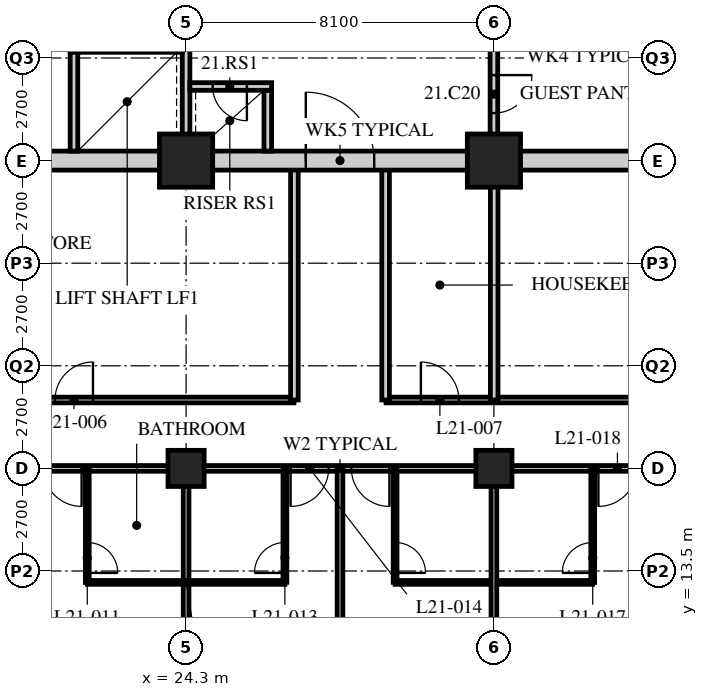
"""IFC4 building model, lengths in metres.
Left out: names, types, materials, properties, quantities, classifications, styles, units other than length and angle.
Written with IfcOpenShell. Run it as: python <this file> out.ifc"""

import sys

from ifc_helpers import new_model, si_unit, direction, frame, frame_2d, origin, origin_2d, place, context, subcontext, project, spatial, rectangle, hollow_rectangle, extrude, element, fill, save


model = new_model("IFC4")
c1 = context("Model", 3, precision=1e-05, world=origin(), true_north=direction((0.0, 1.0)))
c2 = subcontext(c1, "Body", "Model", "MODEL_VIEW")
j1 = project(units=[si_unit("LENGTHUNIT", "METRE"), si_unit("PLANEANGLEUNIT", "RADIAN")], contexts=[c1])
p1 = place(None, origin())
s1 = spatial("IfcSite", under=j1, at=p1, CompositionType="ELEMENT")
p2 = place(p1, origin())
s2 = spatial("IfcBuilding", under=s1, at=p2, CompositionType="ELEMENT")
p3 = place(p2, frame((0.0, 0.0, 84.0)))
s3 = spatial("IfcBuildingStorey", under=s2, at=p3, CompositionType="ELEMENT", Elevation=84.0)
p4 = place(p3, frame((24.3, 16.2, 0.0), z_axis=(0.0, 0.0, 1.0), x_axis=(1.0, 0.0, 0.0)))
e1 = element("IfcColumn", 1, at=p4, inside=s3, PredefinedType="COLUMN", context=c2, shape_type="SweptSolid", body=[
    extrude(hollow_rectangle(XDim=0.95, YDim=0.95, WallThickness=0.095, at=origin_2d()), origin(), (0.0, 0.0, 1.0), 3.4),
])
p5 = place(p3, frame((24.3, 24.3, 0.0), z_axis=(0.0, 0.0, 1.0), x_axis=(1.0, 0.0, 0.0)))
e2 = element("IfcColumn", 2, at=p5, inside=s3, PredefinedType="COLUMN", context=c2, shape_type="SweptSolid", body=[
    extrude(hollow_rectangle(XDim=1.4, YDim=1.4, WallThickness=0.12, at=origin_2d()), origin(), (0.0, 0.0, 1.0), 3.4),
])
p6 = place(p3, frame((32.4, 16.2, 0.0), z_axis=(0.0, 0.0, 1.0), x_axis=(1.0, 0.0, 0.0)))
e3 = element("IfcColumn", 3, at=p6, inside=s3, PredefinedType="COLUMN", context=c2, shape_type="SweptSolid", body=[
    extrude(hollow_rectangle(XDim=0.95, YDim=0.95, WallThickness=0.095, at=origin_2d()), origin(), (0.0, 0.0, 1.0), 3.4),
])
p7 = place(p3, frame((32.4, 24.3, 0.0), z_axis=(0.0, 0.0, 1.0), x_axis=(1.0, 0.0, 0.0)))
e4 = element("IfcColumn", 4, at=p7, inside=s3, PredefinedType="COLUMN", context=c2, shape_type="SweptSolid", body=[
    extrude(hollow_rectangle(XDim=1.4, YDim=1.4, WallThickness=0.12, at=origin_2d()), origin(), (0.0, 0.0, 1.0), 3.4),
])
p8 = place(p3, frame((12.15, 16.2, 0.0), z_axis=(0.0, 0.0, 1.0), x_axis=(1.0, 0.0, 0.0)))
e5 = element("IfcWall", 5, at=p8, inside=s3, PredefinedType="PARTITIONING", context=c2, shape_type="SweptSolid", body=[
    extrude(rectangle(XDim=32.4, YDim=0.15, at=frame_2d((16.2, 0.0))), origin(), (0.0, 0.0, 1.0), 2.428),
])
p9 = place(p8, frame((6.5, 0.0, 0.0)))
e6 = element("IfcOpeningElement", 6, at=p9, cuts=e5, PredefinedType="OPENING", context=c2, shape_type="SweptSolid", body=[
    extrude(rectangle(XDim=1.0, YDim=2.1, at=frame_2d((0.5, 1.05))), frame((0.0, 0.085, 0.0), z_axis=(0.0, -1.0, 0.0), x_axis=(1.0, 0.0, 0.0)), (0.0, 0.0, 1.0), 0.17),
])
p10 = place(p8, frame((8.4, 0.0, 0.0)))
e7 = element("IfcOpeningElement", 7, at=p10, cuts=e5, PredefinedType="OPENING", context=c2, shape_type="SweptSolid", body=[
    extrude(rectangle(XDim=1.0, YDim=2.1, at=frame_2d((0.5, 1.05))), frame((0.0, 0.085, 0.0), z_axis=(0.0, -1.0, 0.0), x_axis=(1.0, 0.0, 0.0)), (0.0, 0.0, 1.0), 0.17),
])
p11 = place(p8, frame((14.9, 0.0, 0.0)))
e8 = element("IfcOpeningElement", 8, at=p11, cuts=e5, PredefinedType="OPENING", context=c2, shape_type="SweptSolid", body=[
    extrude(rectangle(XDim=1.0, YDim=2.1, at=frame_2d((0.5, 1.05))), frame((0.0, 0.085, 0.0), z_axis=(0.0, -1.0, 0.0), x_axis=(1.0, 0.0, 0.0)), (0.0, 0.0, 1.0), 0.17),
])
p12 = place(p8, frame((16.5, 0.0, 0.0)))
e9 = element("IfcOpeningElement", 9, at=p12, cuts=e5, PredefinedType="OPENING", context=c2, shape_type="SweptSolid", body=[
    extrude(rectangle(XDim=1.0, YDim=2.1, at=frame_2d((0.5, 1.05))), frame((0.0, 0.085, 0.0), z_axis=(0.0, -1.0, 0.0), x_axis=(1.0, 0.0, 0.0)), (0.0, 0.0, 1.0), 0.17),
])
p13 = place(p8, frame((23.0, 0.0, 0.0)))
e10 = element("IfcOpeningElement", 10, at=p13, cuts=e5, PredefinedType="OPENING", context=c2, shape_type="SweptSolid", body=[
    extrude(rectangle(XDim=1.0, YDim=2.1, at=frame_2d((0.5, 1.05))), frame((0.0, 0.085, 0.0), z_axis=(0.0, -1.0, 0.0), x_axis=(1.0, 0.0, 0.0)), (0.0, 0.0, 1.0), 0.17),
])
p14 = place(p8, frame((24.9, 0.0, 0.0)))
e11 = element("IfcOpeningElement", 11, at=p14, cuts=e5, PredefinedType="OPENING", context=c2, shape_type="SweptSolid", body=[
    extrude(rectangle(XDim=1.0, YDim=2.1, at=frame_2d((0.5, 1.05))), frame((0.0, 0.085, 0.0), z_axis=(0.0, -1.0, 0.0), x_axis=(1.0, 0.0, 0.0)), (0.0, 0.0, 1.0), 0.17),
])
p15 = place(p8, frame((1.525, 0.0, 0.0)))
e12 = element("IfcOpeningElement", 12, at=p15, cuts=e5, PredefinedType="OPENING", context=c2, shape_type="SweptSolid", body=[
    extrude(rectangle(XDim=1.0, YDim=2.1, at=frame_2d((0.5, 1.05))), frame((0.0, 0.085, 0.0), z_axis=(0.0, -1.0, 0.0), x_axis=(1.0, 0.0, 0.0)), (0.0, 0.0, 1.0), 0.17),
])
p16 = place(p8, frame((29.875, 0.0, 0.0)))
e13 = element("IfcOpeningElement", 13, at=p16, cuts=e5, PredefinedType="OPENING", context=c2, shape_type="SweptSolid", body=[
    extrude(rectangle(XDim=1.0, YDim=2.1, at=frame_2d((0.5, 1.05))), frame((0.0, 0.085, 0.0), z_axis=(0.0, -1.0, 0.0), x_axis=(1.0, 0.0, 0.0)), (0.0, 0.0, 1.0), 0.17),
])
p17 = place(p3, frame((13.95, 18.0, 0.0), z_axis=(0.0, 0.0, 1.0), x_axis=(1.0, 0.0, 0.0)))
e14 = element("IfcWall", 14, at=p17, inside=s3, PredefinedType="PARTITIONING", context=c2, shape_type="SweptSolid", body=[
    extrude(rectangle(XDim=13.19, YDim=0.15, at=frame_2d((6.595, 0.0))), origin(), (0.0, 0.0, 1.0), 3.19),
])
p18 = place(p17, frame((0.3, 0.0, 0.0)))
e15 = element("IfcOpeningElement", 15, at=p18, cuts=e14, PredefinedType="OPENING", context=c2, shape_type="SweptSolid", body=[
    extrude(rectangle(XDim=1.0, YDim=2.1, at=frame_2d((0.5, 1.05))), frame((0.0, 0.085, 0.0), z_axis=(0.0, -1.0, 0.0), x_axis=(1.0, 0.0, 0.0)), (0.0, 0.0, 1.0), 0.17),
])
p19 = place(p17, frame((6.9, 0.0, 0.0)))
e16 = element("IfcOpeningElement", 16, at=p19, cuts=e14, PredefinedType="OPENING", context=c2, shape_type="SweptSolid", body=[
    extrude(rectangle(XDim=1.0, YDim=2.1, at=frame_2d((0.5, 1.05))), frame((0.0, 0.085, 0.0), z_axis=(0.0, -1.0, 0.0), x_axis=(1.0, 0.0, 0.0)), (0.0, 0.0, 1.0), 0.17),
])
p20 = place(p3, frame((29.56, 18.0, 0.0), z_axis=(0.0, 0.0, 1.0), x_axis=(1.0, 0.0, 0.0)))
e17 = element("IfcWall", 17, at=p20, inside=s3, PredefinedType="PARTITIONING", context=c2, shape_type="SweptSolid", body=[
    extrude(rectangle(XDim=13.19, YDim=0.15, at=frame_2d((6.595, 0.0))), origin(), (0.0, 0.0, 1.0), 3.19),
])
p21 = place(p20, frame((0.919, 0.0, 0.0)))
e18 = element("IfcOpeningElement", 18, at=p21, cuts=e17, PredefinedType="OPENING", context=c2, shape_type="SweptSolid", body=[
    extrude(rectangle(XDim=1.0, YDim=2.1, at=frame_2d((0.5, 1.05))), frame((0.0, 0.085, 0.0), z_axis=(0.0, -1.0, 0.0), x_axis=(1.0, 0.0, 0.0)), (0.0, 0.0, 1.0), 0.17),
])
p22 = place(p20, frame((7.519, 0.0, 0.0)))
e19 = element("IfcOpeningElement", 19, at=p22, cuts=e17, PredefinedType="OPENING", context=c2, shape_type="SweptSolid", body=[
    extrude(rectangle(XDim=1.0, YDim=2.1, at=frame_2d((0.5, 1.05))), frame((0.0, 0.085, 0.0), z_axis=(0.0, -1.0, 0.0), x_axis=(1.0, 0.0, 0.0)), (0.0, 0.0, 1.0), 0.17),
])
p23 = place(p3, frame((32.407, 18.0, 0.0), z_axis=(0.0, 0.0, 1.0), x_axis=(0.0, 1.0, 0.0)))
e20 = element("IfcWall", 20, at=p23, inside=s3, PredefinedType="SOLIDWALL", context=c2, shape_type="SweptSolid", body=[
    extrude(rectangle(XDim=6.3, YDim=0.2, at=frame_2d((3.15, 0.0))), origin(), (0.0, 0.0, 1.0), 2.428),
])
for number, where, z_axis, x_axis in (
    (21, (27.15, 18.0, 0.0), (0.0, 0.0, 1.0), (0.0, 1.0, 0.0)),
    (22, (29.55, 18.0, 0.0), (0.0, 0.0, 1.0), (0.0, 1.0, 0.0)),
):
    element("IfcWall", number, at=place(p3, frame(where, z_axis=z_axis, x_axis=x_axis)), inside=s3, PredefinedType="SOLIDWALL", context=c2, shape_type="SweptSolid", body=[
        extrude(rectangle(XDim=6.3, YDim=0.2, at=frame_2d((3.15, 0.0))), origin(), (0.0, 0.0, 1.0), 3.19),
    ])
p24 = place(p3, frame((21.7, 13.2, 0.0), z_axis=(0.0, 0.0, 1.0), x_axis=(1.0, 0.0, 0.0)))
e23 = element("IfcWall", 23, at=p24, inside=s3, PredefinedType="PARTITIONING", context=c2, shape_type="SweptSolid", body=[
    extrude(rectangle(XDim=5.2, YDim=0.1, at=frame_2d((2.6, 0.0))), origin(), (0.0, 0.0, 1.0), 3.19),
])
p25 = place(p3, frame((21.7, 16.2, 0.0), z_axis=(0.0, 0.0, 1.0), x_axis=(0.0, -1.0, 0.0)))
e24 = element("IfcWall", 24, at=p25, inside=s3, PredefinedType="PARTITIONING", context=c2, shape_type="SweptSolid", body=[
    extrude(rectangle(XDim=3.0, YDim=0.1, at=frame_2d((1.5, 0.0))), origin(), (0.0, 0.0, 1.0), 3.19),
])
p26 = place(p25, frame((1.95, 0.0, 0.0)))
e25 = element("IfcOpeningElement", 25, at=p26, cuts=e24, PredefinedType="OPENING", context=c2, shape_type="SweptSolid", body=[
    extrude(rectangle(XDim=0.8, YDim=2.1, at=frame_2d((0.4, 1.05))), frame((0.0, 0.06, 0.0), z_axis=(0.0, -1.0, 0.0), x_axis=(1.0, 0.0, 0.0)), (0.0, 0.0, 1.0), 0.12),
])
p27 = place(p3, frame((24.3, 16.2, 0.0), z_axis=(0.0, 0.0, 1.0), x_axis=(0.0, -1.0, 0.0)))
e26 = element("IfcWall", 26, at=p27, inside=s3, PredefinedType="PARTITIONING", context=c2, shape_type="SweptSolid", body=[
    extrude(rectangle(XDim=15.9, YDim=0.15, at=frame_2d((7.95, 0.0))), origin(), (0.0, 0.0, 1.0), 2.428),
])
p28 = place(p3, frame((26.9, 16.2, 0.0), z_axis=(0.0, 0.0, 1.0), x_axis=(0.0, -1.0, 0.0)))
e27 = element("IfcWall", 27, at=p28, inside=s3, PredefinedType="PARTITIONING", context=c2, shape_type="SweptSolid", body=[
    extrude(rectangle(XDim=3.0, YDim=0.1, at=frame_2d((1.5, 0.0))), origin(), (0.0, 0.0, 1.0), 3.19),
])
p29 = place(p28, frame((1.95, 0.0, 0.0)))
e28 = element("IfcOpeningElement", 28, at=p29, cuts=e27, PredefinedType="OPENING", context=c2, shape_type="SweptSolid", body=[
    extrude(rectangle(XDim=0.8, YDim=2.1, at=frame_2d((0.4, 1.05))), frame((0.0, 0.06, 0.0), z_axis=(0.0, -1.0, 0.0), x_axis=(1.0, 0.0, 0.0)), (0.0, 0.0, 1.0), 0.12),
])
p30 = place(p3, frame((28.35, 16.2, 0.0), z_axis=(0.0, 0.0, 1.0), x_axis=(0.0, -1.0, 0.0)))
e29 = element("IfcWall", 29, at=p30, inside=s3, PredefinedType="PARTITIONING", context=c2, shape_type="SweptSolid", body=[
    extrude(rectangle(XDim=15.9, YDim=0.15, at=frame_2d((7.95, 0.0))), origin(), (0.0, 0.0, 1.0), 3.19),
])
p31 = place(p3, frame((29.8, 13.2, 0.0), z_axis=(0.0, 0.0, 1.0), x_axis=(1.0, 0.0, 0.0)))
e30 = element("IfcWall", 30, at=p31, inside=s3, PredefinedType="PARTITIONING", context=c2, shape_type="SweptSolid", body=[
    extrude(rectangle(XDim=5.2, YDim=0.1, at=frame_2d((2.6, 0.0))), origin(), (0.0, 0.0, 1.0), 3.19),
])
p32 = place(p3, frame((29.8, 16.2, 0.0), z_axis=(0.0, 0.0, 1.0), x_axis=(0.0, -1.0, 0.0)))
e31 = element("IfcWall", 31, at=p32, inside=s3, PredefinedType="PARTITIONING", context=c2, shape_type="SweptSolid", body=[
    extrude(rectangle(XDim=3.0, YDim=0.1, at=frame_2d((1.5, 0.0))), origin(), (0.0, 0.0, 1.0), 3.19),
])
p33 = place(p32, frame((1.95, 0.0, 0.0)))
e32 = element("IfcOpeningElement", 32, at=p33, cuts=e31, PredefinedType="OPENING", context=c2, shape_type="SweptSolid", body=[
    extrude(rectangle(XDim=0.8, YDim=2.1, at=frame_2d((0.4, 1.05))), frame((0.0, 0.06, 0.0), z_axis=(0.0, -1.0, 0.0), x_axis=(1.0, 0.0, 0.0)), (0.0, 0.0, 1.0), 0.12),
])
p34 = place(p3, frame((32.4, 16.2, 0.0), z_axis=(0.0, 0.0, 1.0), x_axis=(0.0, -1.0, 0.0)))
e33 = element("IfcWall", 33, at=p34, inside=s3, PredefinedType="PARTITIONING", context=c2, shape_type="SweptSolid", body=[
    extrude(rectangle(XDim=15.9, YDim=0.15, at=frame_2d((7.95, 0.0))), origin(), (0.0, 0.0, 1.0), 2.428),
])
p35 = place(p3, frame((35.0, 16.2, 0.0), z_axis=(0.0, 0.0, 1.0), x_axis=(0.0, -1.0, 0.0)))
e34 = element("IfcWall", 34, at=p35, inside=s3, PredefinedType="PARTITIONING", context=c2, shape_type="SweptSolid", body=[
    extrude(rectangle(XDim=3.0, YDim=0.1, at=frame_2d((1.5, 0.0))), origin(), (0.0, 0.0, 1.0), 3.19),
])
p36 = place(p35, frame((1.95, 0.0, 0.0)))
e35 = element("IfcOpeningElement", 35, at=p36, cuts=e34, PredefinedType="OPENING", context=c2, shape_type="SweptSolid", body=[
    extrude(rectangle(XDim=0.8, YDim=2.1, at=frame_2d((0.4, 1.05))), frame((0.0, 0.06, 0.0), z_axis=(0.0, -1.0, 0.0), x_axis=(1.0, 0.0, 0.0)), (0.0, 0.0, 1.0), 0.12),
])
p37 = place(p3, frame((15.95, 24.3, 0.0), z_axis=(0.0, 0.0, 1.0), x_axis=(1.0, 0.0, 0.0)))
e36 = element("IfcWall", 36, at=p37, inside=s3, PredefinedType="SOLIDWALL", context=c2, shape_type="SweptSolid", body=[
    extrude(rectangle(XDim=24.8, YDim=0.5, at=frame_2d((12.4, 0.0))), origin(), (0.0, 0.0, 1.0), 2.428),
])
p38 = place(p37, frame((11.5, 0.0, 0.0)))
e37 = element("IfcOpeningElement", 37, at=p38, cuts=e36, PredefinedType="OPENING", context=c2, shape_type="SweptSolid", body=[
    extrude(rectangle(XDim=1.8, YDim=2.4, at=frame_2d((0.9, 1.2))), frame((0.0, 0.26, 0.0), z_axis=(0.0, -1.0, 0.0), x_axis=(1.0, 0.0, 0.0)), (0.0, 0.0, 1.0), 0.52),
])
p39 = place(p3, frame((24.3, 24.55, 0.0), z_axis=(0.0, 0.0, 1.0), x_axis=(0.0, 1.0, 0.0)))
e38 = element("IfcWall", 38, at=p39, inside=s3, PredefinedType="SOLIDWALL", context=c2, shape_type="SweptSolid", body=[
    extrude(rectangle(XDim=7.75, YDim=0.2, at=frame_2d((3.875, 0.0))), origin(), (0.0, 0.0, 1.0), 2.578),
])
p40 = place(p39, frame((4.6, 0.0, 0.0)))
e39 = element("IfcOpeningElement", 39, at=p40, cuts=e38, PredefinedType="OPENING", context=c2, shape_type="SweptSolid", body=[
    extrude(rectangle(XDim=1.2, YDim=2.1, at=frame_2d((0.6, 1.05))), frame((0.0, 0.11, 0.0), z_axis=(0.0, -1.0, 0.0), x_axis=(1.0, 0.0, 0.0)), (0.0, 0.0, 1.0), 0.22),
])
p41 = place(p3, frame((21.35, 24.55, 0.0), z_axis=(0.0, 0.0, 1.0), x_axis=(0.0, 1.0, 0.0)))
e40 = element("IfcWall", 40, at=p41, inside=s3, PredefinedType="SOLIDWALL", context=c2, shape_type="SweptSolid", body=[
    extrude(rectangle(XDim=2.6, YDim=0.2, at=frame_2d((1.3, 0.0))), origin(), (0.0, 0.0, 1.0), 3.19),
])
p42 = place(p3, frame((26.45, 24.55, 0.0), z_axis=(0.0, 0.0, 1.0), x_axis=(0.0, 1.0, 0.0)))
e41 = element("IfcWall", 41, at=p42, inside=s3, PredefinedType="SOLIDWALL", context=c2, shape_type="SweptSolid", body=[
    extrude(rectangle(XDim=1.6, YDim=0.2, at=frame_2d((0.8, 0.0))), origin(), (0.0, 0.0, 1.0), 3.19),
])
p43 = place(p3, frame((24.4, 26.25, 0.0), z_axis=(0.0, 0.0, 1.0), x_axis=(1.0, 0.0, 0.0)))
e42 = element("IfcWall", 42, at=p43, inside=s3, PredefinedType="SOLIDWALL", context=c2, shape_type="SweptSolid", body=[
    extrude(rectangle(XDim=2.15, YDim=0.2, at=frame_2d((1.075, 0.0))), origin(), (0.0, 0.0, 1.0), 3.19),
])
p44 = place(p43, frame((0.6, 0.0, 0.0)))
e43 = element("IfcOpeningElement", 43, at=p44, cuts=e42, PredefinedType="OPENING", context=c2, shape_type="SweptSolid", body=[
    extrude(rectangle(XDim=0.9, YDim=2.1, at=frame_2d((0.45, 1.05))), frame((0.0, 0.11, 0.0), z_axis=(0.0, -1.0, 0.0), x_axis=(1.0, 0.0, 0.0)), (0.0, 0.0, 1.0), 0.22),
])
p45 = place(p3, frame((32.4, 24.55, 0.0), z_axis=(0.0, 0.0, 1.0), x_axis=(0.0, 1.0, 0.0)))
e44 = element("IfcWall", 44, at=p45, inside=s3, PredefinedType="PARTITIONING", context=c2, shape_type="SweptSolid", body=[
    extrude(rectangle(XDim=7.75, YDim=0.2, at=frame_2d((3.875, 0.0))), origin(), (0.0, 0.0, 1.0), 2.578),
])
p46 = place(p45, frame((1.0, 0.0, 0.0)))
e45 = element("IfcOpeningElement", 45, at=p46, cuts=e44, PredefinedType="OPENING", context=c2, shape_type="SweptSolid", body=[
    extrude(rectangle(XDim=1.0, YDim=2.1, at=frame_2d((0.5, 1.05))), frame((0.0, 0.11, 0.0), z_axis=(0.0, -1.0, 0.0), x_axis=(1.0, 0.0, 0.0)), (0.0, 0.0, 1.0), 0.22),
])
p47 = place(p45, frame((3.925, 0.0, 0.0)))
e46 = element("IfcOpeningElement", 46, at=p47, cuts=e44, PredefinedType="OPENING", context=c2, shape_type="SweptSolid", body=[
    extrude(rectangle(XDim=1.0, YDim=2.1, at=frame_2d((0.5, 1.05))), frame((0.0, 0.11, 0.0), z_axis=(0.0, -1.0, 0.0), x_axis=(1.0, 0.0, 0.0)), (0.0, 0.0, 1.0), 0.22),
])
p48 = place(p45, frame((6.1, 0.0, 0.0)))
e47 = element("IfcOpeningElement", 47, at=p48, cuts=e44, PredefinedType="OPENING", context=c2, shape_type="SweptSolid", body=[
    extrude(rectangle(XDim=0.9, YDim=2.1, at=frame_2d((0.45, 1.05))), frame((0.0, 0.11, 0.0), z_axis=(0.0, -1.0, 0.0), x_axis=(1.0, 0.0, 0.0)), (0.0, 0.0, 1.0), 0.22),
])
p49 = place(p19, origin())
e48 = element("IfcDoor", 48, at=p49, inside=s3, OperationType="SINGLE_SWING_RIGHT", PredefinedType="DOOR", context=c2, shape_type="SweptSolid", body=[
    extrude(rectangle(XDim=1.0, YDim=2.1, at=frame_2d((0.5, 1.05))), frame((0.0, 0.025, 0.0), z_axis=(0.0, -1.0, 0.0), x_axis=(1.0, 0.0, 0.0)), (0.0, 0.0, 1.0), 0.05),
])
fill(e16, e48)
p50 = place(p21, origin())
e49 = element("IfcDoor", 49, at=p50, inside=s3, OperationType="SINGLE_SWING_LEFT", PredefinedType="DOOR", context=c2, shape_type="SweptSolid", body=[
    extrude(rectangle(XDim=1.0, YDim=2.1, at=frame_2d((0.5, 1.05))), frame((0.0, 0.025, 0.0), z_axis=(0.0, -1.0, 0.0), x_axis=(1.0, 0.0, 0.0)), (0.0, 0.0, 1.0), 0.05),
])
fill(e18, e49)
p51 = place(p26, origin())
e50 = element("IfcDoor", 50, at=p51, inside=s3, OperationType="SINGLE_SWING_RIGHT", PredefinedType="DOOR", context=c2, shape_type="SweptSolid", body=[
    extrude(rectangle(XDim=0.8, YDim=2.1, at=frame_2d((0.4, 1.05))), frame((0.0, 0.025, 0.0), z_axis=(0.0, -1.0, 0.0), x_axis=(1.0, 0.0, 0.0)), (0.0, 0.0, 1.0), 0.05),
])
fill(e25, e50)
p52 = place(p10, origin())
e51 = element("IfcDoor", 51, at=p52, inside=s3, OperationType="SINGLE_SWING_LEFT", PredefinedType="DOOR", context=c2, shape_type="SweptSolid", body=[
    extrude(rectangle(XDim=1.0, YDim=2.1, at=frame_2d((0.5, 1.05))), frame((0.0, 0.025, 0.0), z_axis=(0.0, -1.0, 0.0), x_axis=(1.0, 0.0, 0.0)), (0.0, 0.0, 1.0), 0.05),
])
fill(e7, e51)
p53 = place(p29, origin())
e52 = element("IfcDoor", 52, at=p53, inside=s3, OperationType="SINGLE_SWING_LEFT", PredefinedType="DOOR", context=c2, shape_type="SweptSolid", body=[
    extrude(rectangle(XDim=0.8, YDim=2.1, at=frame_2d((0.4, 1.05))), frame((0.0, 0.025, 0.0), z_axis=(0.0, -1.0, 0.0), x_axis=(1.0, 0.0, 0.0)), (0.0, 0.0, 1.0), 0.05),
])
fill(e28, e52)
p54 = place(p11, origin())
e53 = element("IfcDoor", 53, at=p54, inside=s3, OperationType="SINGLE_SWING_RIGHT", PredefinedType="DOOR", context=c2, shape_type="SweptSolid", body=[
    extrude(rectangle(XDim=1.0, YDim=2.1, at=frame_2d((0.5, 1.05))), frame((0.0, 0.025, 0.0), z_axis=(0.0, -1.0, 0.0), x_axis=(1.0, 0.0, 0.0)), (0.0, 0.0, 1.0), 0.05),
])
fill(e8, e53)
p55 = place(p33, origin())
e54 = element("IfcDoor", 54, at=p55, inside=s3, OperationType="SINGLE_SWING_RIGHT", PredefinedType="DOOR", context=c2, shape_type="SweptSolid", body=[
    extrude(rectangle(XDim=0.8, YDim=2.1, at=frame_2d((0.4, 1.05))), frame((0.0, 0.025, 0.0), z_axis=(0.0, -1.0, 0.0), x_axis=(1.0, 0.0, 0.0)), (0.0, 0.0, 1.0), 0.05),
])
fill(e32, e54)
p56 = place(p12, origin())
e55 = element("IfcDoor", 55, at=p56, inside=s3, OperationType="SINGLE_SWING_LEFT", PredefinedType="DOOR", context=c2, shape_type="SweptSolid", body=[
    extrude(rectangle(XDim=1.0, YDim=2.1, at=frame_2d((0.5, 1.05))), frame((0.0, 0.025, 0.0), z_axis=(0.0, -1.0, 0.0), x_axis=(1.0, 0.0, 0.0)), (0.0, 0.0, 1.0), 0.05),
])
fill(e9, e55)
p57 = place(p36, origin())
e56 = element("IfcDoor", 56, at=p57, inside=s3, OperationType="SINGLE_SWING_LEFT", PredefinedType="DOOR", context=c2, shape_type="SweptSolid", body=[
    extrude(rectangle(XDim=0.8, YDim=2.1, at=frame_2d((0.4, 1.05))), frame((0.0, 0.025, 0.0), z_axis=(0.0, -1.0, 0.0), x_axis=(1.0, 0.0, 0.0)), (0.0, 0.0, 1.0), 0.05),
])
fill(e35, e56)
p58 = place(p13, origin())
e57 = element("IfcDoor", 57, at=p58, inside=s3, OperationType="SINGLE_SWING_RIGHT", PredefinedType="DOOR", context=c2, shape_type="SweptSolid", body=[
    extrude(rectangle(XDim=1.0, YDim=2.1, at=frame_2d((0.5, 1.05))), frame((0.0, 0.025, 0.0), z_axis=(0.0, -1.0, 0.0), x_axis=(1.0, 0.0, 0.0)), (0.0, 0.0, 1.0), 0.05),
])
fill(e10, e57)
p59 = place(p46, origin())
e58 = element("IfcDoor", 58, at=p59, inside=s3, OperationType="SINGLE_SWING_LEFT", PredefinedType="DOOR", context=c2, shape_type="SweptSolid", body=[
    extrude(rectangle(XDim=1.0, YDim=2.1, at=frame_2d((0.5, 1.05))), frame((0.0, 0.025, 0.0), z_axis=(0.0, -1.0, 0.0), x_axis=(1.0, 0.0, 0.0)), (0.0, 0.0, 1.0), 0.05),
])
fill(e45, e58)
p60 = place(p44, origin())
e59 = element("IfcDoor", 59, at=p60, inside=s3, OperationType="SINGLE_SWING_LEFT", PredefinedType="DOOR", context=c2, shape_type="SweptSolid", body=[
    extrude(rectangle(XDim=0.9, YDim=2.1, at=frame_2d((0.45, 1.05))), frame((0.0, 0.025, 0.0), z_axis=(0.0, -1.0, 0.0), x_axis=(1.0, 0.0, 0.0)), (0.0, 0.0, 1.0), 0.05),
])
fill(e43, e59)
p61 = place(p38, origin())
e60 = element("IfcDoor", 60, at=p61, inside=s3, OperationType="DOUBLE_DOOR_SINGLE_SWING", PredefinedType="DOOR", context=c2, shape_type="SweptSolid", body=[
    extrude(rectangle(XDim=1.8, YDim=2.4, at=frame_2d((0.9, 1.2))), frame((0.0, 0.025, 0.0), z_axis=(0.0, -1.0, 0.0), x_axis=(1.0, 0.0, 0.0)), (0.0, 0.0, 1.0), 0.05),
])
fill(e37, e60)
save(model, sys.argv[1])
